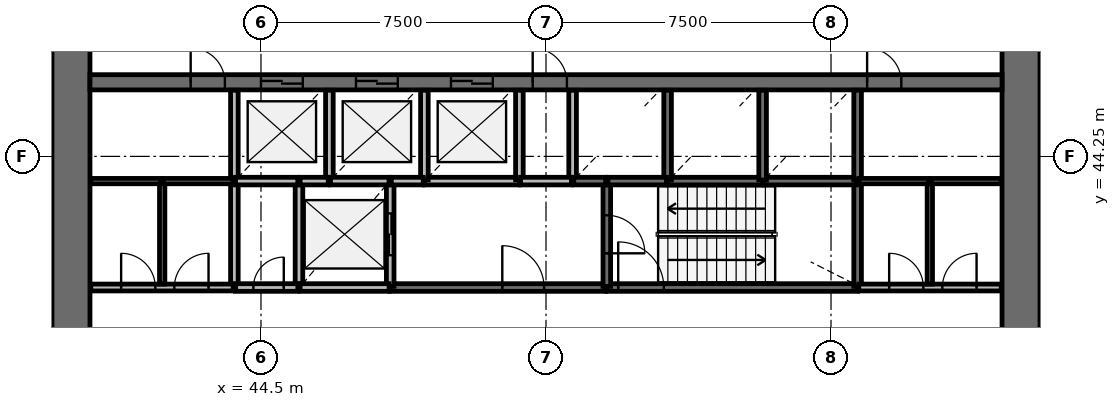
"""IFC4 building model, lengths in metres.
Left out: names, types, materials, properties, quantities, classifications, styles, units other than length and angle.
Written with IfcOpenShell. Run it as: python <this file> out.ifc"""

import sys

from ifc_helpers import new_model, si_unit, direction, frame, frame_2d, origin, place, context, subcontext, project, spatial, rectangle, extrude, source, transform, mapped, element, fill, save


model = new_model("IFC4")
c1 = context("Model", 3, precision=1e-05, world=origin(), true_north=direction((0.0, 1.0)))
c2 = subcontext(c1, "Body", "Model", "MODEL_VIEW")
j1 = project(units=[si_unit("LENGTHUNIT", "METRE"), si_unit("PLANEANGLEUNIT", "RADIAN")], contexts=[c1])
p1 = place(None, origin())
s1 = spatial("IfcSite", under=j1, at=p1, CompositionType="ELEMENT")
p2 = place(p1, origin())
s2 = spatial("IfcBuilding", under=s1, at=p2, CompositionType="ELEMENT")
p3 = place(p2, frame((0.0, 0.0, 40.2)))
s3 = spatial("IfcBuildingStorey", under=s2, at=p3, CompositionType="ELEMENT", Elevation=40.2)
p4 = place(p3, frame((64.5, 38.0, 0.0), z_axis=(0.0, 0.0, 1.0), x_axis=(0.0, 1.0, 0.0)))
e1 = element("IfcWall", 1, at=p4, inside=s3, PredefinedType="SHEAR", context=c2, shape_type="SweptSolid", body=[
    extrude(rectangle(XDim=20.0, YDim=1.0, at=frame_2d((10.0, 0.0))), origin(), (0.0, 0.0, 1.0), 4.4),
])
p5 = place(p4, frame((9.1, 0.0, 0.0)))
e2 = element("IfcOpeningElement", 2, at=p5, cuts=e1, PredefinedType="OPENING", context=c2, shape_type="SweptSolid", body=[
    extrude(rectangle(XDim=1.8, YDim=2.1, at=frame_2d((0.9, 1.05))), frame((0.0, 0.51, 0.0), z_axis=(0.0, -1.0, 0.0), x_axis=(1.0, 0.0, 0.0)), (0.0, 0.0, 1.0), 1.02),
])
p6 = place(p3, frame((39.5, 58.0, 0.0), z_axis=(0.0, 0.0, 1.0), x_axis=(0.0, -1.0, 0.0)))
e3 = element("IfcWall", 3, at=p6, inside=s3, PredefinedType="SHEAR", context=c2, shape_type="SweptSolid", body=[
    extrude(rectangle(XDim=20.0, YDim=1.0, at=frame_2d((10.0, 0.0))), origin(), (0.0, 0.0, 1.0), 4.4),
])
p7 = place(p6, frame((9.1, 0.0, 0.0)))
e4 = element("IfcOpeningElement", 4, at=p7, cuts=e3, PredefinedType="OPENING", context=c2, shape_type="SweptSolid", body=[
    extrude(rectangle(XDim=1.8, YDim=2.1, at=frame_2d((0.9, 1.05))), frame((0.0, 0.51, 0.0), z_axis=(0.0, -1.0, 0.0), x_axis=(1.0, 0.0, 0.0)), (0.0, 0.0, 1.0), 1.02),
])
p8 = place(p3, frame((40.0, 46.2, 0.0), z_axis=(0.0, 0.0, 1.0), x_axis=(1.0, 0.0, 0.0)))
e5 = element("IfcWall", 5, at=p8, inside=s3, PredefinedType="SHEAR", context=c2, shape_type="SweptSolid", body=[
    extrude(rectangle(XDim=24.0, YDim=0.4, at=frame_2d((12.0, 0.0))), origin(), (0.0, 0.0, 1.0), 4.4),
])
p9 = place(p8, frame((4.5, 0.0, 0.0)))
e6 = element("IfcOpeningElement", 6, at=p9, cuts=e5, PredefinedType="OPENING", context=c2, shape_type="SweptSolid", body=[
    extrude(rectangle(XDim=1.1, YDim=2.1, at=frame_2d((0.55, 1.05))), frame((0.0, 0.21, 0.0), z_axis=(0.0, -1.0, 0.0), x_axis=(1.0, 0.0, 0.0)), (0.0, 0.0, 1.0), 0.42),
])
p10 = place(p8, frame((7.0, 0.0, 0.0)))
e7 = element("IfcOpeningElement", 7, at=p10, cuts=e5, PredefinedType="OPENING", context=c2, shape_type="SweptSolid", body=[
    extrude(rectangle(XDim=1.1, YDim=2.1, at=frame_2d((0.55, 1.05))), frame((0.0, 0.21, 0.0), z_axis=(0.0, -1.0, 0.0), x_axis=(1.0, 0.0, 0.0)), (0.0, 0.0, 1.0), 0.42),
])
p11 = place(p8, frame((9.5, 0.0, 0.0)))
e8 = element("IfcOpeningElement", 8, at=p11, cuts=e5, PredefinedType="OPENING", context=c2, shape_type="SweptSolid", body=[
    extrude(rectangle(XDim=1.1, YDim=2.1, at=frame_2d((0.55, 1.05))), frame((0.0, 0.21, 0.0), z_axis=(0.0, -1.0, 0.0), x_axis=(1.0, 0.0, 0.0)), (0.0, 0.0, 1.0), 0.42),
])
p12 = place(p8, frame((20.45, 0.0, 0.0)))
e9 = element("IfcOpeningElement", 9, at=p12, cuts=e5, PredefinedType="OPENING", context=c2, shape_type="SweptSolid", body=[
    extrude(rectangle(XDim=0.9, YDim=2.1, at=frame_2d((0.45, 1.05))), frame((0.0, 0.21, 0.0), z_axis=(0.0, -1.0, 0.0), x_axis=(1.0, 0.0, 0.0)), (0.0, 0.0, 1.0), 0.42),
])
p13 = place(p8, frame((2.65, 0.0, 0.0)))
e10 = element("IfcOpeningElement", 10, at=p13, cuts=e5, PredefinedType="OPENING", context=c2, shape_type="SweptSolid", body=[
    extrude(rectangle(XDim=0.9, YDim=2.1, at=frame_2d((0.45, 1.05))), frame((0.0, 0.21, 0.0), z_axis=(0.0, -1.0, 0.0), x_axis=(1.0, 0.0, 0.0)), (0.0, 0.0, 1.0), 0.42),
])
p14 = place(p8, frame((11.65, 0.0, 0.0)))
e11 = element("IfcOpeningElement", 11, at=p14, cuts=e5, PredefinedType="OPENING", context=c2, shape_type="SweptSolid", body=[
    extrude(rectangle(XDim=0.9, YDim=2.1, at=frame_2d((0.45, 1.05))), frame((0.0, 0.21, 0.0), z_axis=(0.0, -1.0, 0.0), x_axis=(1.0, 0.0, 0.0)), (0.0, 0.0, 1.0), 0.42),
])
p15 = place(p3, frame((53.6, 40.8, 0.0), z_axis=(0.0, 0.0, 1.0), x_axis=(1.0, 0.0, 0.0)))
e12 = element("IfcWall", 12, at=p15, inside=s3, PredefinedType="SOLIDWALL", context=c2, shape_type="SweptSolid", body=[
    extrude(rectangle(XDim=6.6, YDim=0.2, at=frame_2d((3.3, 0.0))), origin(), (0.0, 0.0, 1.0), 3.95),
])
p16 = place(p15, frame((0.3, 0.0, 0.0)))
e13 = element("IfcOpeningElement", 13, at=p16, cuts=e12, PredefinedType="OPENING", context=c2, shape_type="SweptSolid", body=[
    extrude(rectangle(XDim=1.2, YDim=2.1, at=frame_2d((0.6, 1.05))), frame((0.0, 0.11, 0.0), z_axis=(0.0, -1.0, 0.0), x_axis=(1.0, 0.0, 0.0)), (0.0, 0.0, 1.0), 0.22),
])
p17 = place(p3, frame((47.9, 40.8, 0.0), z_axis=(0.0, 0.0, 1.0), x_axis=(1.0, 0.0, 0.0)))
e14 = element("IfcWall", 14, at=p17, inside=s3, PredefinedType="SOLIDWALL", context=c2, shape_type="SweptSolid", body=[
    extrude(rectangle(XDim=5.67, YDim=0.2, at=frame_2d((2.835, 0.0))), origin(), (0.0, 0.0, 1.0), 3.95),
])
p18 = place(p17, frame((2.95, 0.0, 0.0)))
e15 = element("IfcOpeningElement", 15, at=p18, cuts=e14, PredefinedType="OPENING", context=c2, shape_type="SweptSolid", body=[
    extrude(rectangle(XDim=1.1, YDim=2.1, at=frame_2d((0.55, 1.05))), frame((0.0, 0.11, 0.0), z_axis=(0.0, -1.0, 0.0), x_axis=(1.0, 0.0, 0.0)), (0.0, 0.0, 1.0), 0.22),
])
for number, where, z_axis, x_axis in (
    (16, (43.8, 43.6, 0.0), (0.0, 0.0, 1.0), (0.0, -1.0, 0.0)),
    (17, (45.5, 43.6, 0.0), (0.0, 0.0, 1.0), (0.0, -1.0, 0.0)),
):
    element("IfcWall", number, at=place(p3, frame(where, z_axis=z_axis, x_axis=x_axis)), inside=s3, PredefinedType="SOLIDWALL", context=c2, shape_type="SweptSolid", body=[
        extrude(rectangle(XDim=2.8, YDim=0.2, at=frame_2d((1.4, 0.0))), origin(), (0.0, 0.0, 1.0), 3.95),
    ])
p19 = place(p3, frame((47.9, 40.83, 0.0), z_axis=(0.0, 0.0, 1.0), x_axis=(0.0, 1.0, 0.0)))
e18 = element("IfcWall", 18, at=p19, inside=s3, PredefinedType="SOLIDWALL", context=c2, shape_type="SweptSolid", body=[
    extrude(rectangle(XDim=2.77, YDim=0.2, at=frame_2d((1.385, 0.0))), origin(), (0.0, 0.0, 1.0), 3.95),
])
p20 = place(p19, frame((0.82, 0.0, 0.0)))
e19 = element("IfcOpeningElement", 19, at=p20, cuts=e18, PredefinedType="OPENING", context=c2, shape_type="SweptSolid", body=[
    extrude(rectangle(XDim=1.1, YDim=2.1, at=frame_2d((0.55, 1.05))), frame((0.0, 0.11, 0.0), z_axis=(0.0, -1.0, 0.0), x_axis=(1.0, 0.0, 0.0)), (0.0, 0.0, 1.0), 0.22),
])
p21 = place(p3, frame((60.2, 40.83, 0.0), z_axis=(0.0, 0.0, 1.0), x_axis=(0.0, 1.0, 0.0)))
e20 = element("IfcWall", 20, at=p21, inside=s3, PredefinedType="SOLIDWALL", context=c2, shape_type="SweptSolid", body=[
    extrude(rectangle(XDim=2.77, YDim=0.2, at=frame_2d((1.385, 0.0))), origin(), (0.0, 0.0, 1.0), 3.95),
])
p22 = place(p3, frame((53.6, 43.6, 0.0), z_axis=(0.0, 0.0, 1.0), x_axis=(0.0, -1.0, 0.0)))
e21 = element("IfcWall", 21, at=p22, inside=s3, PredefinedType="SOLIDWALL", context=c2, shape_type="SweptSolid", body=[
    extrude(rectangle(XDim=2.77, YDim=0.2, at=frame_2d((1.385, 0.0))), origin(), (0.0, 0.0, 1.0), 3.95),
])
p23 = place(p22, frame((0.9, 0.0, 0.0)))
e22 = element("IfcOpeningElement", 22, at=p23, cuts=e21, PredefinedType="OPENING", context=c2, shape_type="SweptSolid", body=[
    extrude(rectangle(XDim=1.0, YDim=2.1, at=frame_2d((0.5, 1.05))), frame((0.0, 0.11, 0.0), z_axis=(0.0, -1.0, 0.0), x_axis=(1.0, 0.0, 0.0)), (0.0, 0.0, 1.0), 0.22),
])
for number, where, z_axis, x_axis in (
    (23, (48.8, 43.6, 0.0), (0.0, 0.0, 1.0), (1.0, 0.0, 0.0)),
    (24, (55.2, 43.6, 0.0), (0.0, 0.0, 1.0), (1.0, 0.0, 0.0)),
):
    element("IfcWall", number, at=place(p3, frame(where, z_axis=z_axis, x_axis=x_axis)), inside=s3, PredefinedType="SOLIDWALL", context=c2, shape_type="SweptSolid", body=[
        extrude(rectangle(XDim=2.5, YDim=0.2, at=frame_2d((1.25, 0.0))), origin(), (0.0, 0.0, 1.0), 3.95),
    ])
p24 = place(p3, frame((57.73, 43.6, 0.0), z_axis=(0.0, 0.0, 1.0), x_axis=(1.0, 0.0, 0.0)))
e25 = element("IfcWall", 25, at=p24, inside=s3, PredefinedType="SOLIDWALL", context=c2, shape_type="SweptSolid", body=[
    extrude(rectangle(XDim=2.44, YDim=0.2, at=frame_2d((1.22, 0.0))), origin(), (0.0, 0.0, 1.0), 3.95),
])
p25 = place(p3, frame((45.53, 40.8, 0.0), z_axis=(0.0, 0.0, 1.0), x_axis=(1.0, 0.0, 0.0)))
e26 = element("IfcWall", 26, at=p25, inside=s3, PredefinedType="SOLIDWALL", context=c2, shape_type="SweptSolid", body=[
    extrude(rectangle(XDim=2.34, YDim=0.2, at=frame_2d((1.17, 0.0))), origin(), (0.0, 0.0, 1.0), 3.95),
])
p26 = place(p3, frame((43.8, 45.99, 0.0), z_axis=(0.0, 0.0, 1.0), x_axis=(0.0, -1.0, 0.0)))
e27 = element("IfcWall", 27, at=p26, inside=s3, PredefinedType="SOLIDWALL", context=c2, shape_type="SweptSolid", body=[
    extrude(rectangle(XDim=2.36, YDim=0.2, at=frame_2d((1.18, 0.0))), origin(), (0.0, 0.0, 1.0), 3.95),
])
p27 = place(p3, frame((46.3, 43.6, 0.0), z_axis=(0.0, 0.0, 1.0), x_axis=(0.0, 1.0, 0.0)))
e28 = element("IfcWall", 28, at=p27, inside=s3, PredefinedType="SOLIDWALL", context=c2, shape_type="SweptSolid", body=[
    extrude(rectangle(XDim=2.39, YDim=0.2, at=frame_2d((1.195, 0.0))), origin(), (0.0, 0.0, 1.0), 3.95),
])
for number, where, z_axis, x_axis in (
    (29, (48.8, 43.63, 0.0), (0.0, 0.0, 1.0), (0.0, 1.0, 0.0)),
    (30, (51.3, 43.63, 0.0), (0.0, 0.0, 1.0), (0.0, 1.0, 0.0)),
):
    element("IfcWall", number, at=place(p3, frame(where, z_axis=z_axis, x_axis=x_axis)), inside=s3, PredefinedType="SOLIDWALL", context=c2, shape_type="SweptSolid", body=[
        extrude(rectangle(XDim=2.36, YDim=0.2, at=frame_2d((1.18, 0.0))), origin(), (0.0, 0.0, 1.0), 3.95),
    ])
p28 = place(p3, frame((52.7, 45.99, 0.0), z_axis=(0.0, 0.0, 1.0), x_axis=(0.0, -1.0, 0.0)))
e31 = element("IfcWall", 31, at=p28, inside=s3, PredefinedType="SOLIDWALL", context=c2, shape_type="SweptSolid", body=[
    extrude(rectangle(XDim=2.39, YDim=0.2, at=frame_2d((1.195, 0.0))), origin(), (0.0, 0.0, 1.0), 3.95),
])
for number, where, z_axis, x_axis in (
    (32, (55.2, 43.63, 0.0), (0.0, 0.0, 1.0), (0.0, 1.0, 0.0)),
    (33, (57.7, 43.63, 0.0), (0.0, 0.0, 1.0), (0.0, 1.0, 0.0)),
    (34, (60.2, 43.63, 0.0), (0.0, 0.0, 1.0), (0.0, 1.0, 0.0)),
):
    element("IfcWall", number, at=place(p3, frame(where, z_axis=z_axis, x_axis=x_axis)), inside=s3, PredefinedType="SOLIDWALL", context=c2, shape_type="SweptSolid", body=[
        extrude(rectangle(XDim=2.36, YDim=0.2, at=frame_2d((1.18, 0.0))), origin(), (0.0, 0.0, 1.0), 3.95),
    ])
p29 = place(p3, frame((43.83, 43.6, 0.0), z_axis=(0.0, 0.0, 1.0), x_axis=(1.0, 0.0, 0.0)))
e35 = element("IfcWall", 35, at=p29, inside=s3, PredefinedType="SOLIDWALL", context=c2, shape_type="SweptSolid", body=[
    extrude(rectangle(XDim=1.64, YDim=0.2, at=frame_2d((0.82, 0.0))), origin(), (0.0, 0.0, 1.0), 3.95),
])
p30 = place(p3, frame((43.83, 40.8, 0.0), z_axis=(0.0, 0.0, 1.0), x_axis=(1.0, 0.0, 0.0)))
e36 = element("IfcWall", 36, at=p30, inside=s3, PredefinedType="SOLIDWALL", context=c2, shape_type="SweptSolid", body=[
    extrude(rectangle(XDim=1.64, YDim=0.2, at=frame_2d((0.82, 0.0))), origin(), (0.0, 0.0, 1.0), 3.95),
])
p31 = place(p30, frame((0.47, 0.0, 0.0)))
e37 = element("IfcOpeningElement", 37, at=p31, cuts=e36, PredefinedType="OPENING", context=c2, shape_type="SweptSolid", body=[
    extrude(rectangle(XDim=0.8, YDim=2.1, at=frame_2d((0.4, 1.05))), frame((0.0, 0.11, 0.0), z_axis=(0.0, -1.0, 0.0), x_axis=(1.0, 0.0, 0.0)), (0.0, 0.0, 1.0), 0.22),
])
for number, where, z_axis, x_axis in (
    (38, (46.33, 43.6, 0.0), (0.0, 0.0, 1.0), (1.0, 0.0, 0.0)),
    (39, (53.63, 43.6, 0.0), (0.0, 0.0, 1.0), (1.0, 0.0, 0.0)),
):
    element("IfcWall", number, at=place(p3, frame(where, z_axis=z_axis, x_axis=x_axis)), inside=s3, PredefinedType="SOLIDWALL", context=c2, shape_type="SweptSolid", body=[
        extrude(rectangle(XDim=1.54, YDim=0.2, at=frame_2d((0.77, 0.0))), origin(), (0.0, 0.0, 1.0), 3.95),
    ])
p32 = place(p3, frame((52.67, 43.6, 0.0), z_axis=(0.0, 0.0, 1.0), x_axis=(-1.0, 0.0, 0.0)))
e40 = element("IfcWall", 40, at=p32, inside=s3, PredefinedType="SOLIDWALL", context=c2, shape_type="SweptSolid", body=[
    extrude(rectangle(XDim=1.34, YDim=0.2, at=frame_2d((0.67, 0.0))), origin(), (0.0, 0.0, 1.0), 3.95),
])
for number, where, z_axis, x_axis in (
    (41, (47.93, 43.6, 0.0), (0.0, 0.0, 1.0), (1.0, 0.0, 0.0)),
    (42, (52.73, 43.6, 0.0), (0.0, 0.0, 1.0), (1.0, 0.0, 0.0)),
):
    element("IfcWall", number, at=place(p3, frame(where, z_axis=z_axis, x_axis=x_axis)), inside=s3, PredefinedType="SOLIDWALL", context=c2, shape_type="SweptSolid", body=[
        extrude(rectangle(XDim=0.84, YDim=0.2, at=frame_2d((0.42, 0.0))), origin(), (0.0, 0.0, 1.0), 3.95),
    ])
p33 = place(p3, frame((45.53, 43.6, 0.0), z_axis=(0.0, 0.0, 1.0), x_axis=(1.0, 0.0, 0.0)))
e43 = element("IfcWall", 43, at=p33, inside=s3, PredefinedType="SOLIDWALL", context=c2, shape_type="SweptSolid", body=[
    extrude(rectangle(XDim=0.74, YDim=0.2, at=frame_2d((0.37, 0.0))), origin(), (0.0, 0.0, 1.0), 3.95),
])
p34 = place(p3, frame((40.02, 40.8, 0.0), z_axis=(0.0, 0.0, 1.0), x_axis=(1.0, 0.0, 0.0)))
e44 = element("IfcWall", 44, at=p34, inside=s3, PredefinedType="PARTITIONING", context=c2, shape_type="SweptSolid", body=[
    extrude(rectangle(XDim=3.75, YDim=0.18, at=frame_2d((1.875, 0.0))), origin(), (0.0, 0.0, 1.0), 3.95),
])
p35 = place(p34, frame((0.8, 0.0, 0.0)))
e45 = element("IfcOpeningElement", 45, at=p35, cuts=e44, PredefinedType="OPENING", context=c2, shape_type="SweptSolid", body=[
    extrude(rectangle(XDim=0.9, YDim=2.1, at=frame_2d((0.45, 1.05))), frame((0.0, 0.1, 0.0), z_axis=(0.0, -1.0, 0.0), x_axis=(1.0, 0.0, 0.0)), (0.0, 0.0, 1.0), 0.2),
])
p36 = place(p34, frame((2.2, 0.0, 0.0)))
e46 = element("IfcOpeningElement", 46, at=p36, cuts=e44, PredefinedType="OPENING", context=c2, shape_type="SweptSolid", body=[
    extrude(rectangle(XDim=0.9, YDim=2.1, at=frame_2d((0.45, 1.05))), frame((0.0, 0.1, 0.0), z_axis=(0.0, -1.0, 0.0), x_axis=(1.0, 0.0, 0.0)), (0.0, 0.0, 1.0), 0.2),
])
p37 = place(p3, frame((60.23, 40.8, 0.0), z_axis=(0.0, 0.0, 1.0), x_axis=(1.0, 0.0, 0.0)))
e47 = element("IfcWall", 47, at=p37, inside=s3, PredefinedType="PARTITIONING", context=c2, shape_type="SweptSolid", body=[
    extrude(rectangle(XDim=3.75, YDim=0.18, at=frame_2d((1.875, 0.0))), origin(), (0.0, 0.0, 1.0), 3.95),
])
p38 = place(p37, frame((0.8, 0.0, 0.0)))
e48 = element("IfcOpeningElement", 48, at=p38, cuts=e47, PredefinedType="OPENING", context=c2, shape_type="SweptSolid", body=[
    extrude(rectangle(XDim=0.9, YDim=2.1, at=frame_2d((0.45, 1.05))), frame((0.0, 0.1, 0.0), z_axis=(0.0, -1.0, 0.0), x_axis=(1.0, 0.0, 0.0)), (0.0, 0.0, 1.0), 0.2),
])
p39 = place(p37, frame((2.2, 0.0, 0.0)))
e49 = element("IfcOpeningElement", 49, at=p39, cuts=e47, PredefinedType="OPENING", context=c2, shape_type="SweptSolid", body=[
    extrude(rectangle(XDim=0.9, YDim=2.1, at=frame_2d((0.45, 1.05))), frame((0.0, 0.1, 0.0), z_axis=(0.0, -1.0, 0.0), x_axis=(1.0, 0.0, 0.0)), (0.0, 0.0, 1.0), 0.2),
])
for number, where, z_axis, x_axis in (
    (50, (41.9, 40.89, 0.0), (0.0, 0.0, 1.0), (0.0, 1.0, 0.0)),
    (51, (62.1, 40.89, 0.0), (0.0, 0.0, 1.0), (0.0, 1.0, 0.0)),
):
    element("IfcWall", number, at=place(p3, frame(where, z_axis=z_axis, x_axis=x_axis)), inside=s3, PredefinedType="PARTITIONING", context=c2, shape_type="SweptSolid", body=[
        extrude(rectangle(XDim=2.71, YDim=0.14, at=frame_2d((1.355, 0.0))), origin(), (0.0, 0.0, 1.0), 3.05),
    ])
for number, where, z_axis, x_axis in (
    (52, (43.77, 43.6, 0.0), (0.0, 0.0, 1.0), (-1.0, 0.0, 0.0)),
    (53, (60.23, 43.6, 0.0), (0.0, 0.0, 1.0), (1.0, 0.0, 0.0)),
):
    element("IfcWall", number, at=place(p3, frame(where, z_axis=z_axis, x_axis=x_axis)), inside=s3, PredefinedType="PARTITIONING", context=c2, shape_type="SweptSolid", body=[
        extrude(rectangle(XDim=1.84, YDim=0.14, at=frame_2d((0.92, 0.0))), origin(), (0.0, 0.0, 1.0), 3.05),
    ])
for number, where, z_axis, x_axis in (
    (54, (41.87, 43.6, 0.0), (0.0, 0.0, 1.0), (-1.0, 0.0, 0.0)),
    (55, (62.13, 43.6, 0.0), (0.0, 0.0, 1.0), (1.0, 0.0, 0.0)),
):
    element("IfcWall", number, at=place(p3, frame(where, z_axis=z_axis, x_axis=x_axis)), inside=s3, PredefinedType="PARTITIONING", context=c2, shape_type="SweptSolid", body=[
        extrude(rectangle(XDim=1.85, YDim=0.14, at=frame_2d((0.925, 0.0))), origin(), (0.0, 0.0, 1.0), 3.05),
    ])
m1 = source(origin(), c2, "Body", "SweptSolid", [
    extrude(rectangle(XDim=1.1, YDim=2.1, at=frame_2d((0.55, 1.05))), frame((0.0, 0.025, 0.0), z_axis=(0.0, -1.0, 0.0), x_axis=(1.0, 0.0, 0.0)), (0.0, 0.0, 1.0), 0.05),
])
p40 = place(p9, origin())
e56 = element("IfcDoor", 56, at=p40, inside=s3, OperationType="DOUBLE_DOOR_SLIDING", PredefinedType="USERDEFINED", context=c2, shape_type="MappedRepresentation", body=[
    mapped(m1, transform((0.0, 0.0, 0.0), scale=1.0)),
])
fill(e6, e56)
p41 = place(p10, origin())
e57 = element("IfcDoor", 57, at=p41, inside=s3, OperationType="DOUBLE_DOOR_SLIDING", PredefinedType="USERDEFINED", context=c2, shape_type="MappedRepresentation", body=[
    mapped(m1, transform((0.0, 0.0, 0.0), scale=1.0)),
])
fill(e7, e57)
p42 = place(p11, origin())
e58 = element("IfcDoor", 58, at=p42, inside=s3, OperationType="DOUBLE_DOOR_SLIDING", PredefinedType="USERDEFINED", context=c2, shape_type="MappedRepresentation", body=[
    mapped(m1, transform((0.0, 0.0, 0.0), scale=1.0)),
])
fill(e8, e58)
p43 = place(p20, origin())
e59 = element("IfcDoor", 59, at=p43, inside=s3, OperationType="DOUBLE_DOOR_SLIDING", PredefinedType="USERDEFINED", context=c2, shape_type="MappedRepresentation", body=[
    mapped(m1, transform((0.0, 0.0, 0.0), scale=1.0)),
])
fill(e19, e59)
m2 = source(origin(), c2, "Body", "SweptSolid", [
    extrude(rectangle(XDim=1.2, YDim=2.1, at=frame_2d((0.6, 1.05))), frame((0.0, 0.025, 0.0), z_axis=(0.0, -1.0, 0.0), x_axis=(1.0, 0.0, 0.0)), (0.0, 0.0, 1.0), 0.05),
])
p44 = place(p16, origin())
e60 = element("IfcDoor", 60, at=p44, inside=s3, OperationType="SINGLE_SWING_LEFT", PredefinedType="DOOR", context=c2, shape_type="MappedRepresentation", body=[
    mapped(m2, transform((0.0, 0.0, 0.0), scale=1.0)),
])
fill(e13, e60)
m3 = source(origin(), c2, "Body", "SweptSolid", [
    extrude(rectangle(XDim=1.0, YDim=2.1, at=frame_2d((0.5, 1.05))), frame((0.0, 0.025, 0.0), z_axis=(0.0, -1.0, 0.0), x_axis=(1.0, 0.0, 0.0)), (0.0, 0.0, 1.0), 0.05),
])
p45 = place(p23, origin())
e61 = element("IfcDoor", 61, at=p45, inside=s3, OperationType="SINGLE_SWING_RIGHT", PredefinedType="DOOR", context=c2, shape_type="MappedRepresentation", body=[
    mapped(m3, transform((0.0, 0.0, 0.0), scale=1.0)),
])
fill(e22, e61)
m4 = source(origin(), c2, "Body", "SweptSolid", [
    extrude(rectangle(XDim=1.1, YDim=2.1, at=frame_2d((0.55, 1.05))), frame((0.0, 0.025, 0.0), z_axis=(0.0, -1.0, 0.0), x_axis=(1.0, 0.0, 0.0)), (0.0, 0.0, 1.0), 0.05),
])
p46 = place(p18, origin())
e62 = element("IfcDoor", 62, at=p46, inside=s3, OperationType="SINGLE_SWING_LEFT", PredefinedType="DOOR", context=c2, shape_type="MappedRepresentation", body=[
    mapped(m4, transform((0.0, 0.0, 0.0), scale=1.0)),
])
fill(e15, e62)
m5 = source(origin(), c2, "Body", "SweptSolid", [
    extrude(rectangle(XDim=0.8, YDim=2.1, at=frame_2d((0.4, 1.05))), frame((0.0, 0.025, 0.0), z_axis=(0.0, -1.0, 0.0), x_axis=(1.0, 0.0, 0.0)), (0.0, 0.0, 1.0), 0.05),
])
p47 = place(p31, origin())
e63 = element("IfcDoor", 63, at=p47, inside=s3, OperationType="SINGLE_SWING_RIGHT", PredefinedType="DOOR", context=c2, shape_type="MappedRepresentation", body=[
    mapped(m5, transform((0.0, 0.0, 0.0), scale=1.0)),
])
fill(e37, e63)
m6 = source(origin(), c2, "Body", "SweptSolid", [
    extrude(rectangle(XDim=0.9, YDim=2.1, at=frame_2d((0.45, 1.05))), frame((0.0, 0.025, 0.0), z_axis=(0.0, -1.0, 0.0), x_axis=(1.0, 0.0, 0.0)), (0.0, 0.0, 1.0), 0.05),
])
p48 = place(p35, origin())
e64 = element("IfcDoor", 64, at=p48, inside=s3, OperationType="SINGLE_SWING_LEFT", PredefinedType="DOOR", context=c2, shape_type="MappedRepresentation", body=[
    mapped(m6, transform((0.0, 0.0, 0.0), scale=1.0)),
])
fill(e45, e64)
p49 = place(p36, origin())
e65 = element("IfcDoor", 65, at=p49, inside=s3, OperationType="SINGLE_SWING_RIGHT", PredefinedType="DOOR", context=c2, shape_type="MappedRepresentation", body=[
    mapped(m6, transform((0.0, 0.0, 0.0), scale=1.0)),
])
fill(e46, e65)
p50 = place(p12, origin())
e66 = element("IfcDoor", 66, at=p50, inside=s3, OperationType="SINGLE_SWING_LEFT", PredefinedType="DOOR", context=c2, shape_type="MappedRepresentation", body=[
    mapped(m6, transform((0.0, 0.0, 0.0), scale=1.0)),
])
fill(e9, e66)
p51 = place(p38, origin())
e67 = element("IfcDoor", 67, at=p51, inside=s3, OperationType="SINGLE_SWING_LEFT", PredefinedType="DOOR", context=c2, shape_type="MappedRepresentation", body=[
    mapped(m6, transform((0.0, 0.0, 0.0), scale=1.0)),
])
fill(e48, e67)
p52 = place(p39, origin())
e68 = element("IfcDoor", 68, at=p52, inside=s3, OperationType="SINGLE_SWING_RIGHT", PredefinedType="DOOR", context=c2, shape_type="MappedRepresentation", body=[
    mapped(m6, transform((0.0, 0.0, 0.0), scale=1.0)),
])
fill(e49, e68)
p53 = place(p13, origin())
e69 = element("IfcDoor", 69, at=p53, inside=s3, OperationType="SINGLE_SWING_LEFT", PredefinedType="DOOR", context=c2, shape_type="MappedRepresentation", body=[
    mapped(m6, transform((0.0, 0.0, 0.0), scale=1.0)),
])
fill(e10, e69)
p54 = place(p14, origin())
e70 = element("IfcDoor", 70, at=p54, inside=s3, OperationType="SINGLE_SWING_LEFT", PredefinedType="DOOR", context=c2, shape_type="MappedRepresentation", body=[
    mapped(m6, transform((0.0, 0.0, 0.0), scale=1.0)),
])
fill(e11, e70)
save(model, sys.argv[1])
